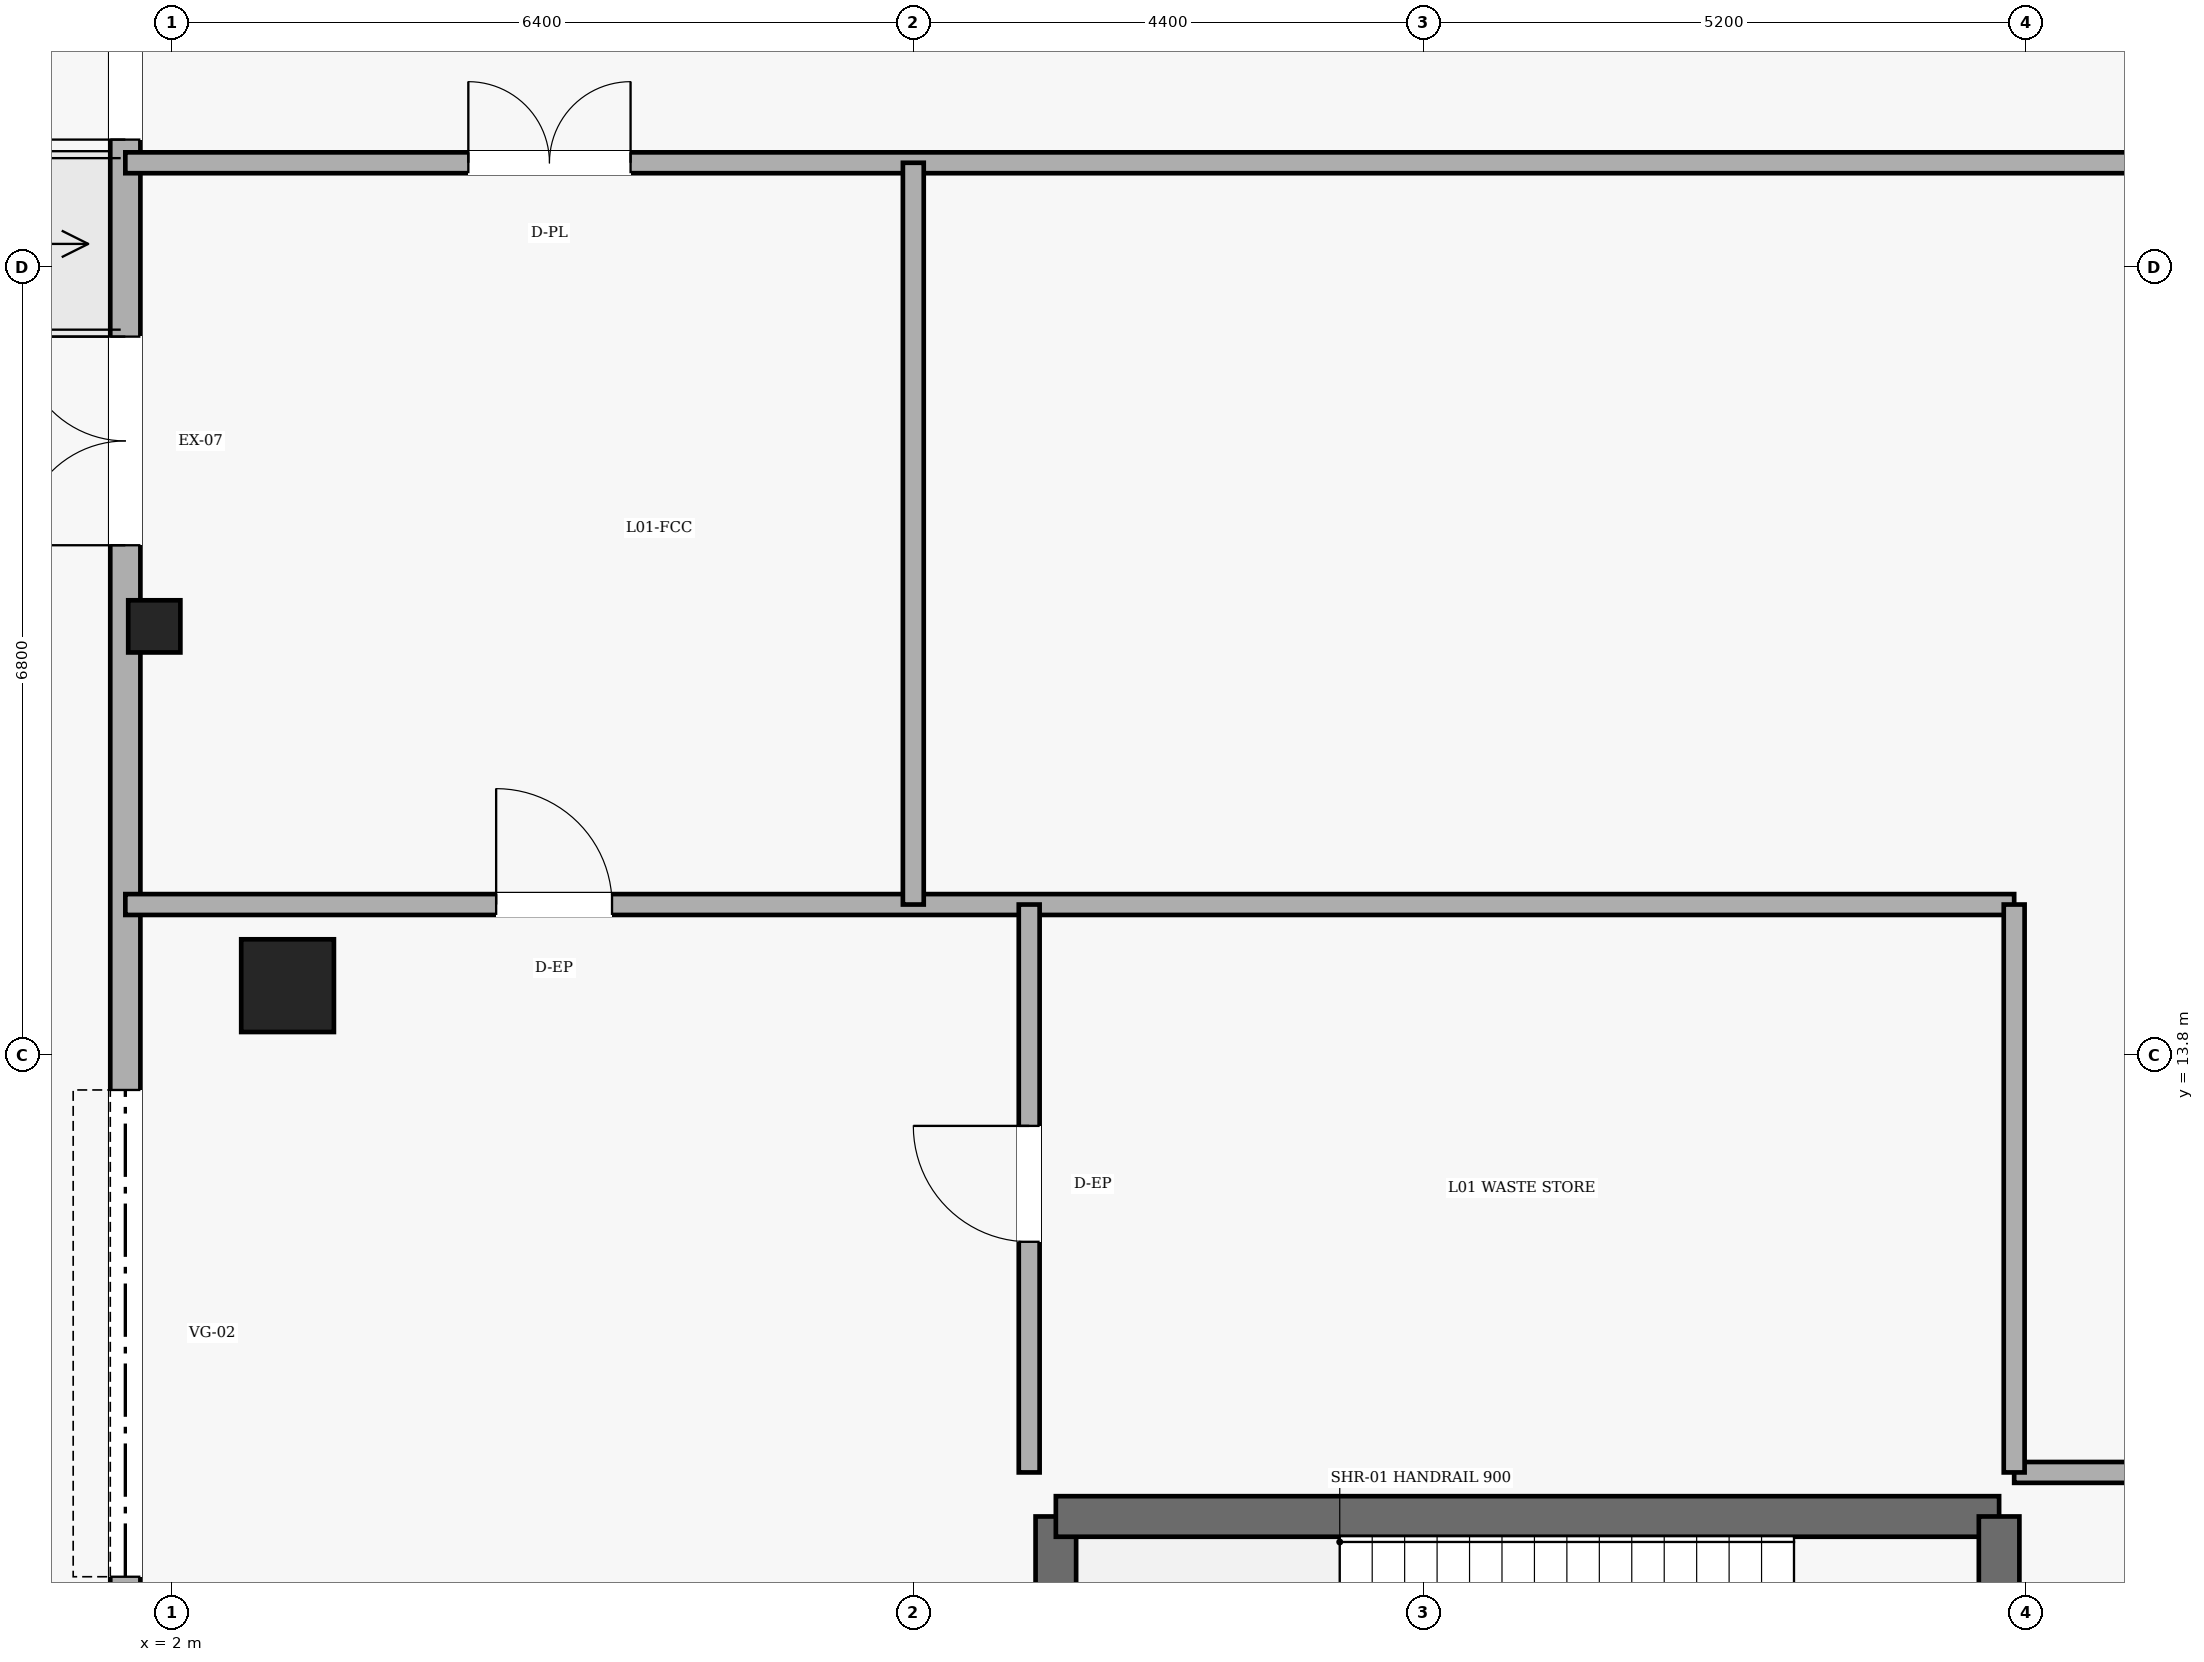
"""IFC4 building model, lengths in metres.
Left out: names, types, materials, properties, quantities, classifications, styles, units other than length and angle.
Written with IfcOpenShell. Run it as: python <this file> out.ifc"""

import sys

from ifc_helpers import new_model, si_unit, direction, frame, frame_2d, origin, origin_2d, place, context, subcontext, project, spatial, rectangle, extrude, element, fill, save


model = new_model("IFC4")
c1 = context("Model", 3, precision=1e-05, world=origin(), true_north=direction((0.0, 1.0)))
c2 = subcontext(c1, "Body", "Model", "MODEL_VIEW")
j1 = project(units=[si_unit("LENGTHUNIT", "METRE"), si_unit("PLANEANGLEUNIT", "RADIAN")], contexts=[c1])
p1 = place(None, origin())
s1 = spatial("IfcSite", under=j1, at=p1, CompositionType="ELEMENT")
p2 = place(p1, origin())
s2 = spatial("IfcBuilding", under=s1, at=p2, CompositionType="ELEMENT")
p3 = place(p2, origin())
s3 = spatial("IfcBuildingStorey", under=s2, at=p3, CompositionType="ELEMENT", Elevation=0.0)
p4 = place(p3, frame((3.0, 14.4, 0.0), z_axis=(0.0, 0.0, 1.0), x_axis=(1.0, 0.0, 0.0)))
e1 = element("IfcColumn", 1, at=p4, inside=s3, PredefinedType="COLUMN", context=c2, shape_type="SweptSolid", body=[
    extrude(rectangle(XDim=0.8, YDim=0.8, at=origin_2d()), origin(), (0.0, 0.0, 1.0), 5.4),
])
p5 = place(p3, frame((1.85, 17.5, 0.0), z_axis=(0.0, 0.0, 1.0), x_axis=(1.0, 0.0, 0.0)))
e2 = element("IfcColumn", 2, at=p5, inside=s3, PredefinedType="PILASTER", context=c2, shape_type="SweptSolid", body=[
    extrude(rectangle(XDim=0.45, YDim=0.45, at=origin_2d()), origin(), (0.0, 0.0, 1.0), 5.18),
])
p6 = place(p3, frame((1.6, 0.2, 0.0), z_axis=(0.0, 0.0, 1.0), x_axis=(0.0, 1.0, 0.0)))
e3 = element("IfcWall", 3, at=p6, inside=s3, PredefinedType="SOLIDWALL", context=c2, shape_type="SweptSolid", body=[
    extrude(rectangle(XDim=47.6, YDim=0.26, at=frame_2d((23.8, 0.0))), origin(), (0.0, 0.0, 1.0), 5.18),
])
p7 = place(p6, frame((9.1, 0.0, 0.0)))
e4 = element("IfcOpeningElement", 4, at=p7, cuts=e3, PredefinedType="OPENING", context=c2, shape_type="SweptSolid", body=[
    extrude(rectangle(XDim=4.2, YDim=3.6, at=frame_2d((2.1, 1.8))), frame((0.0, 0.14, 0.0), z_axis=(0.0, -1.0, 0.0), x_axis=(1.0, 0.0, 0.0)), (0.0, 0.0, 1.0), 0.28),
])
p8 = place(p6, frame((21.5, 0.0, 0.0)))
e5 = element("IfcOpeningElement", 5, at=p8, cuts=e3, PredefinedType="OPENING", context=c2, shape_type="SweptSolid", body=[
    extrude(rectangle(XDim=2.0, YDim=2.5, at=frame_2d((1.0, 1.25))), frame((0.0, 0.14, 0.0), z_axis=(0.0, -1.0, 0.0), x_axis=(1.0, 0.0, 0.0)), (0.0, 0.0, 1.0), 0.28),
])
p9 = place(p6, frame((28.6, 0.0, 0.0)))
e6 = element("IfcOpeningElement", 6, at=p9, cuts=e3, PredefinedType="OPENING", context=c2, shape_type="SweptSolid", body=[
    extrude(rectangle(XDim=1.8, YDim=2.4, at=frame_2d((0.9, 1.2))), frame((0.0, 0.14, 0.0), z_axis=(0.0, -1.0, 0.0), x_axis=(1.0, 0.0, 0.0)), (0.0, 0.0, 1.0), 0.28),
])
p10 = place(p6, frame((18.0, 0.0, 0.0)))
e7 = element("IfcOpeningElement", 7, at=p10, cuts=e3, PredefinedType="OPENING", context=c2, shape_type="SweptSolid", body=[
    extrude(rectangle(XDim=1.8, YDim=2.4, at=frame_2d((0.9, 1.2))), frame((0.0, 0.14, 0.0), z_axis=(0.0, -1.0, 0.0), x_axis=(1.0, 0.0, 0.0)), (0.0, 0.0, 1.0), 0.28),
])
p11 = place(p3, frame((9.63, 6.18, 0.0), z_axis=(0.0, 0.0, 1.0), x_axis=(0.0, 1.0, 0.0)))
e8 = element("IfcWall", 8, at=p11, inside=s3, PredefinedType="SOLIDWALL", context=c2, shape_type="SweptSolid", body=[
    extrude(rectangle(XDim=3.64, YDim=0.35, at=frame_2d((1.82, 0.0))), origin(), (0.0, 0.0, 1.0), 5.4),
])
p12 = place(p3, frame((9.63, 9.82, 0.0), z_axis=(0.0, 0.0, 1.0), x_axis=(1.0, 0.0, 0.0)))
e9 = element("IfcWall", 9, at=p12, inside=s3, PredefinedType="SOLIDWALL", context=c2, shape_type="SweptSolid", body=[
    extrude(rectangle(XDim=8.14, YDim=0.35, at=frame_2d((4.07, 0.0))), origin(), (0.0, 0.0, 1.0), 5.4),
])
p13 = place(p3, frame((17.77, 6.18, 0.0), z_axis=(0.0, 0.0, 1.0), x_axis=(0.0, 1.0, 0.0)))
e10 = element("IfcWall", 10, at=p13, inside=s3, PredefinedType="SOLIDWALL", context=c2, shape_type="SweptSolid", body=[
    extrude(rectangle(XDim=3.64, YDim=0.35, at=frame_2d((1.82, 0.0))), origin(), (0.0, 0.0, 1.0), 5.4),
])
p14 = place(p13, frame((1.25, 0.0, 0.0)))
e11 = element("IfcOpeningElement", 11, at=p14, cuts=e10, PredefinedType="OPENING", context=c2, shape_type="SweptSolid", body=[
    extrude(rectangle(XDim=1.1, YDim=2.15, at=frame_2d((0.55, 1.075))), frame((0.0, 0.185, 0.0), z_axis=(0.0, -1.0, 0.0), x_axis=(1.0, 0.0, 0.0)), (0.0, 0.0, 1.0), 0.37),
])
p15 = place(p3, frame((17.9, 10.2, 0.0), z_axis=(0.0, 0.0, 1.0), x_axis=(1.0, 0.0, 0.0)))
e12 = element("IfcWall", 12, at=p15, inside=s3, PredefinedType="PARTITIONING", context=c2, shape_type="SweptSolid", body=[
    extrude(rectangle(XDim=2.6, YDim=0.18, at=frame_2d((1.3, 0.0))), origin(), (0.0, 0.0, 1.0), 5.18),
])
p16 = place(p3, frame((1.6, 15.1, 0.0), z_axis=(0.0, 0.0, 1.0), x_axis=(1.0, 0.0, 0.0)))
e13 = element("IfcWall", 13, at=p16, inside=s3, PredefinedType="PARTITIONING", context=c2, shape_type="SweptSolid", body=[
    extrude(rectangle(XDim=16.3, YDim=0.18, at=frame_2d((8.15, 0.0))), origin(), (0.0, 0.0, 1.0), 5.18),
])
p17 = place(p16, frame((3.2, 0.0, 0.0)))
e14 = element("IfcOpeningElement", 14, at=p17, cuts=e13, PredefinedType="OPENING", context=c2, shape_type="SweptSolid", body=[
    extrude(rectangle(XDim=1.0, YDim=2.15, at=frame_2d((0.5, 1.075))), frame((0.0, 0.1, 0.0), z_axis=(0.0, -1.0, 0.0), x_axis=(1.0, 0.0, 0.0)), (0.0, 0.0, 1.0), 0.2),
])
p18 = place(p3, frame((1.6, 21.5, 0.0), z_axis=(0.0, 0.0, 1.0), x_axis=(1.0, 0.0, 0.0)))
e15 = element("IfcWall", 15, at=p18, inside=s3, PredefinedType="PARTITIONING", context=c2, shape_type="SweptSolid", body=[
    extrude(rectangle(XDim=19.88, YDim=0.18, at=frame_2d((9.94, 0.0))), origin(), (0.0, 0.0, 1.0), 3.282),
])
p19 = place(p18, frame((2.96, 0.0, 0.0)))
e16 = element("IfcOpeningElement", 16, at=p19, cuts=e15, PredefinedType="OPENING", context=c2, shape_type="SweptSolid", body=[
    extrude(rectangle(XDim=1.4, YDim=2.25, at=frame_2d((0.7, 1.125))), frame((0.0, 0.1, 0.0), z_axis=(0.0, -1.0, 0.0), x_axis=(1.0, 0.0, 0.0)), (0.0, 0.0, 1.0), 0.2),
])
p20 = place(p3, frame((8.4, 15.1, 0.0), z_axis=(0.0, 0.0, 1.0), x_axis=(0.0, 1.0, 0.0)))
e17 = element("IfcWall", 17, at=p20, inside=s3, PredefinedType="PARTITIONING", context=c2, shape_type="SweptSolid", body=[
    extrude(rectangle(XDim=6.4, YDim=0.18, at=frame_2d((3.2, 0.0))), origin(), (0.0, 0.0, 1.0), 5.18),
])
p21 = place(p3, frame((9.4, 10.2, 0.0), z_axis=(0.0, 0.0, 1.0), x_axis=(0.0, 1.0, 0.0)))
e18 = element("IfcWall", 18, at=p21, inside=s3, PredefinedType="PARTITIONING", context=c2, shape_type="SweptSolid", body=[
    extrude(rectangle(XDim=4.9, YDim=0.18, at=frame_2d((2.45, 0.0))), origin(), (0.0, 0.0, 1.0), 5.18),
])
p22 = place(p21, frame((1.99, 0.0, 0.0)))
e19 = element("IfcOpeningElement", 19, at=p22, cuts=e18, PredefinedType="OPENING", context=c2, shape_type="SweptSolid", body=[
    extrude(rectangle(XDim=1.0, YDim=2.15, at=frame_2d((0.5, 1.075))), frame((0.0, 0.1, 0.0), z_axis=(0.0, -1.0, 0.0), x_axis=(1.0, 0.0, 0.0)), (0.0, 0.0, 1.0), 0.2),
])
p23 = place(p3, frame((17.9, 10.2, 0.0), z_axis=(0.0, 0.0, 1.0), x_axis=(0.0, 1.0, 0.0)))
e20 = element("IfcWall", 20, at=p23, inside=s3, PredefinedType="PARTITIONING", context=c2, shape_type="SweptSolid", body=[
    extrude(rectangle(XDim=4.9, YDim=0.18, at=frame_2d((2.45, 0.0))), origin(), (0.0, 0.0, 1.0), 5.18),
])
p24 = place(p7, origin())
e21 = element("IfcDoor", 21, at=p24, inside=s3, OperationType="ROLLINGUP", PredefinedType="GATE", context=c2, shape_type="SweptSolid", body=[
    extrude(rectangle(XDim=4.2, YDim=3.6, at=frame_2d((2.1, 1.8))), frame((0.0, 0.025, 0.0), z_axis=(0.0, -1.0, 0.0), x_axis=(1.0, 0.0, 0.0)), (0.0, 0.0, 1.0), 0.05),
])
fill(e4, e21)
p25 = place(p8, origin())
e22 = element("IfcDoor", 22, at=p25, inside=s3, OperationType="DOUBLE_DOOR_SINGLE_SWING", PredefinedType="DOOR", context=c2, shape_type="SweptSolid", body=[
    extrude(rectangle(XDim=2.0, YDim=2.5, at=frame_2d((1.0, 1.25))), frame((0.0, 0.025, 0.0), z_axis=(0.0, -1.0, 0.0), x_axis=(1.0, 0.0, 0.0)), (0.0, 0.0, 1.0), 0.05),
])
fill(e5, e22)
p26 = place(p10, origin())
e23 = element("IfcDoor", 23, at=p26, inside=s3, OperationType="DOUBLE_DOOR_SINGLE_SWING", PredefinedType="DOOR", context=c2, shape_type="SweptSolid", body=[
    extrude(rectangle(XDim=1.8, YDim=2.4, at=frame_2d((0.9, 1.2))), frame((0.0, 0.025, 0.0), z_axis=(0.0, -1.0, 0.0), x_axis=(1.0, 0.0, 0.0)), (0.0, 0.0, 1.0), 0.05),
])
fill(e7, e23)
p27 = place(p19, origin())
e24 = element("IfcDoor", 24, at=p27, inside=s3, OperationType="DOUBLE_DOOR_SINGLE_SWING", PredefinedType="DOOR", context=c2, shape_type="SweptSolid", body=[
    extrude(rectangle(XDim=1.4, YDim=2.25, at=frame_2d((0.7, 1.125))), frame((0.0, 0.025, 0.0), z_axis=(0.0, -1.0, 0.0), x_axis=(1.0, 0.0, 0.0)), (0.0, 0.0, 1.0), 0.05),
])
fill(e16, e24)
p28 = place(p17, origin())
e25 = element("IfcDoor", 25, at=p28, inside=s3, OperationType="SINGLE_SWING_LEFT", PredefinedType="DOOR", context=c2, shape_type="SweptSolid", body=[
    extrude(rectangle(XDim=1.0, YDim=2.15, at=frame_2d((0.5, 1.075))), frame((0.0, 0.025, 0.0), z_axis=(0.0, -1.0, 0.0), x_axis=(1.0, 0.0, 0.0)), (0.0, 0.0, 1.0), 0.05),
])
fill(e14, e25)
p29 = place(p22, origin())
e26 = element("IfcDoor", 26, at=p29, inside=s3, OperationType="SINGLE_SWING_RIGHT", PredefinedType="DOOR", context=c2, shape_type="SweptSolid", body=[
    extrude(rectangle(XDim=1.0, YDim=2.15, at=frame_2d((0.5, 1.075))), frame((0.0, 0.025, 0.0), z_axis=(0.0, -1.0, 0.0), x_axis=(1.0, 0.0, 0.0)), (0.0, 0.0, 1.0), 0.05),
])
fill(e19, e26)
save(model, sys.argv[1])
